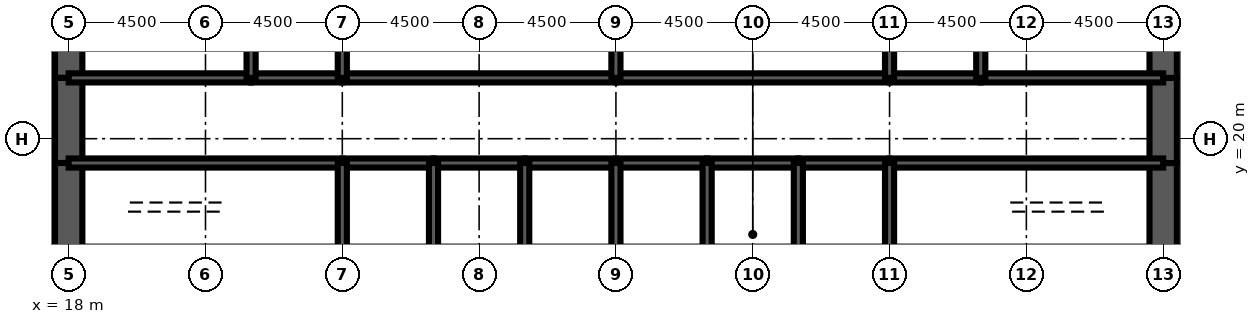
"""IFC4 building model, lengths in metres.
Left out: names, types, materials, properties, quantities, classifications, styles, units other than length and angle.
Written with IfcOpenShell. Run it as: python <this file> out.ifc"""

import sys

from ifc_helpers import new_model, si_unit, direction, frame, frame_2d, origin, place, context, subcontext, project, spatial, rectangle, extrude, element, fill, save


model = new_model("IFC4")
c1 = context("Model", 3, precision=1e-05, world=origin(), true_north=direction((0.0, 1.0)))
c2 = subcontext(c1, "Body", "Model", "MODEL_VIEW")
j1 = project(units=[si_unit("LENGTHUNIT", "METRE"), si_unit("PLANEANGLEUNIT", "RADIAN")], contexts=[c1])
p1 = place(None, origin())
s1 = spatial("IfcSite", under=j1, at=p1, CompositionType="ELEMENT")
p2 = place(p1, origin())
s2 = spatial("IfcBuilding", under=s1, at=p2, CompositionType="ELEMENT")
p3 = place(p2, frame((0.0, 0.0, 108.9)))
s3 = spatial("IfcBuildingStorey", under=s2, at=p3, CompositionType="ELEMENT", Elevation=108.9)
p4 = place(p3, frame((18.0, 26.0, 0.0), z_axis=(0.0, 0.0, 1.0), x_axis=(0.0, -1.0, 0.0)))
e1 = element("IfcWall", 1, at=p4, inside=s3, PredefinedType="SHEAR", context=c2, shape_type="SweptSolid", body=[
    extrude(rectangle(XDim=4.0, YDim=0.9, at=frame_2d((2.0, 0.0))), origin(), (0.0, 0.0, 1.0), 4.2),
])
p5 = place(p3, frame((18.0, 22.0, 0.0), z_axis=(0.0, 0.0, 1.0), x_axis=(0.0, -1.0, 0.0)))
e2 = element("IfcWall", 2, at=p5, inside=s3, PredefinedType="SHEAR", context=c2, shape_type="SweptSolid", body=[
    extrude(rectangle(XDim=2.8, YDim=0.9, at=frame_2d((1.4, 0.0))), origin(), (0.0, 0.0, 1.0), 4.2),
])
p6 = place(p5, frame((0.6, 0.0, 0.0)))
e3 = element("IfcOpeningElement", 3, at=p6, cuts=e2, PredefinedType="OPENING", context=c2, shape_type="SweptSolid", body=[
    extrude(rectangle(XDim=1.8, YDim=2.1, at=frame_2d((0.9, 1.05))), frame((0.0, 0.46, 0.0), z_axis=(0.0, -1.0, 0.0), x_axis=(1.0, 0.0, 0.0)), (0.0, 0.0, 1.0), 0.92),
])
for number, where, z_axis, x_axis in (
    (4, (18.0, 19.2, 0.0), (0.0, 0.0, 1.0), (0.0, -1.0, 0.0)),
    (5, (54.0, 16.0, 0.0), (0.0, 0.0, 1.0), (0.0, 1.0, 0.0)),
):
    element("IfcWall", number, at=place(p3, frame(where, z_axis=z_axis, x_axis=x_axis)), inside=s3, PredefinedType="SHEAR", context=c2, shape_type="SweptSolid", body=[
        extrude(rectangle(XDim=3.2, YDim=0.9, at=frame_2d((1.6, 0.0))), origin(), (0.0, 0.0, 1.0), 4.2),
    ])
p7 = place(p3, frame((54.0, 19.2, 0.0), z_axis=(0.0, 0.0, 1.0), x_axis=(0.0, 1.0, 0.0)))
e6 = element("IfcWall", 6, at=p7, inside=s3, PredefinedType="SHEAR", context=c2, shape_type="SweptSolid", body=[
    extrude(rectangle(XDim=2.8, YDim=0.9, at=frame_2d((1.4, 0.0))), origin(), (0.0, 0.0, 1.0), 4.2),
])
p8 = place(p7, frame((0.4, 0.0, 0.0)))
e7 = element("IfcOpeningElement", 7, at=p8, cuts=e6, PredefinedType="OPENING", context=c2, shape_type="SweptSolid", body=[
    extrude(rectangle(XDim=1.8, YDim=2.1, at=frame_2d((0.9, 1.05))), frame((0.0, 0.46, 0.0), z_axis=(0.0, -1.0, 0.0), x_axis=(1.0, 0.0, 0.0)), (0.0, 0.0, 1.0), 0.92),
])
p9 = place(p3, frame((54.0, 22.0, 0.0), z_axis=(0.0, 0.0, 1.0), x_axis=(0.0, 1.0, 0.0)))
e8 = element("IfcWall", 8, at=p9, inside=s3, PredefinedType="SHEAR", context=c2, shape_type="SweptSolid", body=[
    extrude(rectangle(XDim=4.0, YDim=0.9, at=frame_2d((2.0, 0.0))), origin(), (0.0, 0.0, 1.0), 4.2),
])
p10 = place(p3, frame((18.0, 19.2, 0.0), z_axis=(0.0, 0.0, 1.0), x_axis=(1.0, 0.0, 0.0)))
e9 = element("IfcWall", 9, at=p10, inside=s3, PredefinedType="SOLIDWALL", context=c2, shape_type="SweptSolid", body=[
    extrude(rectangle(XDim=9.0, YDim=0.3, at=frame_2d((4.5, 0.0))), origin(), (0.0, 0.0, 1.0), 4.2),
])
p11 = place(p10, frame((0.65, 0.0, 0.0)))
e10 = element("IfcOpeningElement", 10, at=p11, cuts=e9, PredefinedType="OPENING", context=c2, shape_type="SweptSolid", body=[
    extrude(rectangle(XDim=1.0, YDim=2.1, at=frame_2d((0.5, 1.05))), frame((0.0, 0.16, 0.0), z_axis=(0.0, -1.0, 0.0), x_axis=(1.0, 0.0, 0.0)), (0.0, 0.0, 1.0), 0.32),
])
p12 = place(p3, frame((27.0, 19.2, 0.0), z_axis=(0.0, 0.0, 1.0), x_axis=(1.0, 0.0, 0.0)))
e11 = element("IfcWall", 11, at=p12, inside=s3, PredefinedType="SOLIDWALL", context=c2, shape_type="SweptSolid", body=[
    extrude(rectangle(XDim=3.0, YDim=0.3, at=frame_2d((1.5, 0.0))), origin(), (0.0, 0.0, 1.0), 4.2),
])
p13 = place(p12, frame((0.95, 0.0, 0.0)))
e12 = element("IfcOpeningElement", 12, at=p13, cuts=e11, PredefinedType="OPENING", context=c2, shape_type="SweptSolid", body=[
    extrude(rectangle(XDim=1.1, YDim=2.2, at=frame_2d((0.55, 1.1))), frame((0.0, 0.16, 0.0), z_axis=(0.0, -1.0, 0.0), x_axis=(1.0, 0.0, 0.0)), (0.0, 0.0, 1.0), 0.32),
])
p14 = place(p3, frame((30.0, 19.2, 0.0), z_axis=(0.0, 0.0, 1.0), x_axis=(1.0, 0.0, 0.0)))
e13 = element("IfcWall", 13, at=p14, inside=s3, PredefinedType="SOLIDWALL", context=c2, shape_type="SweptSolid", body=[
    extrude(rectangle(XDim=3.0, YDim=0.3, at=frame_2d((1.5, 0.0))), origin(), (0.0, 0.0, 1.0), 4.2),
])
p15 = place(p14, frame((0.95, 0.0, 0.0)))
e14 = element("IfcOpeningElement", 14, at=p15, cuts=e13, PredefinedType="OPENING", context=c2, shape_type="SweptSolid", body=[
    extrude(rectangle(XDim=1.1, YDim=2.2, at=frame_2d((0.55, 1.1))), frame((0.0, 0.16, 0.0), z_axis=(0.0, -1.0, 0.0), x_axis=(1.0, 0.0, 0.0)), (0.0, 0.0, 1.0), 0.32),
])
p16 = place(p3, frame((33.0, 19.2, 0.0), z_axis=(0.0, 0.0, 1.0), x_axis=(1.0, 0.0, 0.0)))
e15 = element("IfcWall", 15, at=p16, inside=s3, PredefinedType="SOLIDWALL", context=c2, shape_type="SweptSolid", body=[
    extrude(rectangle(XDim=3.0, YDim=0.3, at=frame_2d((1.5, 0.0))), origin(), (0.0, 0.0, 1.0), 4.2),
])
p17 = place(p16, frame((0.95, 0.0, 0.0)))
e16 = element("IfcOpeningElement", 16, at=p17, cuts=e15, PredefinedType="OPENING", context=c2, shape_type="SweptSolid", body=[
    extrude(rectangle(XDim=1.1, YDim=2.2, at=frame_2d((0.55, 1.1))), frame((0.0, 0.16, 0.0), z_axis=(0.0, -1.0, 0.0), x_axis=(1.0, 0.0, 0.0)), (0.0, 0.0, 1.0), 0.32),
])
p18 = place(p3, frame((36.0, 19.2, 0.0), z_axis=(0.0, 0.0, 1.0), x_axis=(1.0, 0.0, 0.0)))
e17 = element("IfcWall", 17, at=p18, inside=s3, PredefinedType="SOLIDWALL", context=c2, shape_type="SweptSolid", body=[
    extrude(rectangle(XDim=3.0, YDim=0.3, at=frame_2d((1.5, 0.0))), origin(), (0.0, 0.0, 1.0), 4.2),
])
p19 = place(p18, frame((0.95, 0.0, 0.0)))
e18 = element("IfcOpeningElement", 18, at=p19, cuts=e17, PredefinedType="OPENING", context=c2, shape_type="SweptSolid", body=[
    extrude(rectangle(XDim=1.1, YDim=2.2, at=frame_2d((0.55, 1.1))), frame((0.0, 0.16, 0.0), z_axis=(0.0, -1.0, 0.0), x_axis=(1.0, 0.0, 0.0)), (0.0, 0.0, 1.0), 0.32),
])
p20 = place(p3, frame((39.0, 19.2, 0.0), z_axis=(0.0, 0.0, 1.0), x_axis=(1.0, 0.0, 0.0)))
e19 = element("IfcWall", 19, at=p20, inside=s3, PredefinedType="SOLIDWALL", context=c2, shape_type="SweptSolid", body=[
    extrude(rectangle(XDim=3.0, YDim=0.3, at=frame_2d((1.5, 0.0))), origin(), (0.0, 0.0, 1.0), 4.2),
])
p21 = place(p20, frame((1.0, 0.0, 0.0)))
e20 = element("IfcOpeningElement", 20, at=p21, cuts=e19, PredefinedType="OPENING", context=c2, shape_type="SweptSolid", body=[
    extrude(rectangle(XDim=1.0, YDim=2.1, at=frame_2d((0.5, 1.05))), frame((0.0, 0.16, 0.0), z_axis=(0.0, -1.0, 0.0), x_axis=(1.0, 0.0, 0.0)), (0.0, 0.0, 1.0), 0.32),
])
p22 = place(p3, frame((42.0, 19.2, 0.0), z_axis=(0.0, 0.0, 1.0), x_axis=(1.0, 0.0, 0.0)))
e21 = element("IfcWall", 21, at=p22, inside=s3, PredefinedType="SOLIDWALL", context=c2, shape_type="SweptSolid", body=[
    extrude(rectangle(XDim=3.0, YDim=0.3, at=frame_2d((1.5, 0.0))), origin(), (0.0, 0.0, 1.0), 4.2),
])
p23 = place(p3, frame((45.0, 19.2, 0.0), z_axis=(0.0, 0.0, 1.0), x_axis=(1.0, 0.0, 0.0)))
e22 = element("IfcWall", 22, at=p23, inside=s3, PredefinedType="SOLIDWALL", context=c2, shape_type="SweptSolid", body=[
    extrude(rectangle(XDim=9.0, YDim=0.3, at=frame_2d((4.5, 0.0))), origin(), (0.0, 0.0, 1.0), 4.2),
])
p24 = place(p23, frame((7.35, 0.0, 0.0)))
e23 = element("IfcOpeningElement", 23, at=p24, cuts=e22, PredefinedType="OPENING", context=c2, shape_type="SweptSolid", body=[
    extrude(rectangle(XDim=1.0, YDim=2.1, at=frame_2d((0.5, 1.05))), frame((0.0, 0.16, 0.0), z_axis=(0.0, -1.0, 0.0), x_axis=(1.0, 0.0, 0.0)), (0.0, 0.0, 1.0), 0.32),
])
p25 = place(p3, frame((18.0, 22.0, 0.0), z_axis=(0.0, 0.0, 1.0), x_axis=(1.0, 0.0, 0.0)))
e24 = element("IfcWall", 24, at=p25, inside=s3, PredefinedType="SOLIDWALL", context=c2, shape_type="SweptSolid", body=[
    extrude(rectangle(XDim=6.0, YDim=0.3, at=frame_2d((3.0, 0.0))), origin(), (0.0, 0.0, 1.0), 4.2),
])
p26 = place(p25, frame((4.4, 0.0, 0.0)))
e25 = element("IfcOpeningElement", 25, at=p26, cuts=e24, PredefinedType="OPENING", context=c2, shape_type="SweptSolid", body=[
    extrude(rectangle(XDim=1.0, YDim=2.1, at=frame_2d((0.5, 1.05))), frame((0.0, 0.16, 0.0), z_axis=(0.0, -1.0, 0.0), x_axis=(1.0, 0.0, 0.0)), (0.0, 0.0, 1.0), 0.32),
])
p27 = place(p25, frame((0.85, 0.0, 0.0)))
e26 = element("IfcOpeningElement", 26, at=p27, cuts=e24, PredefinedType="OPENING", context=c2, shape_type="SweptSolid", body=[
    extrude(rectangle(XDim=1.0, YDim=2.1, at=frame_2d((0.5, 1.05))), frame((0.0, 0.16, 0.0), z_axis=(0.0, -1.0, 0.0), x_axis=(1.0, 0.0, 0.0)), (0.0, 0.0, 1.0), 0.32),
])
p28 = place(p3, frame((24.0, 22.0, 0.0), z_axis=(0.0, 0.0, 1.0), x_axis=(1.0, 0.0, 0.0)))
e27 = element("IfcWall", 27, at=p28, inside=s3, PredefinedType="SOLIDWALL", context=c2, shape_type="SweptSolid", body=[
    extrude(rectangle(XDim=3.0, YDim=0.3, at=frame_2d((1.5, 0.0))), origin(), (0.0, 0.0, 1.0), 4.2),
])
p29 = place(p28, frame((1.0, 0.0, 0.0)))
e28 = element("IfcOpeningElement", 28, at=p29, cuts=e27, PredefinedType="OPENING", context=c2, shape_type="SweptSolid", body=[
    extrude(rectangle(XDim=1.0, YDim=2.1, at=frame_2d((0.5, 1.05))), frame((0.0, 0.16, 0.0), z_axis=(0.0, -1.0, 0.0), x_axis=(1.0, 0.0, 0.0)), (0.0, 0.0, 1.0), 0.32),
])
p30 = place(p3, frame((27.0, 22.0, 0.0), z_axis=(0.0, 0.0, 1.0), x_axis=(1.0, 0.0, 0.0)))
e29 = element("IfcWall", 29, at=p30, inside=s3, PredefinedType="SOLIDWALL", context=c2, shape_type="SweptSolid", body=[
    extrude(rectangle(XDim=9.0, YDim=0.3, at=frame_2d((4.5, 0.0))), origin(), (0.0, 0.0, 1.0), 4.2),
])
p31 = place(p30, frame((4.0, 0.0, 0.0)))
e30 = element("IfcOpeningElement", 30, at=p31, cuts=e29, PredefinedType="OPENING", context=c2, shape_type="SweptSolid", body=[
    extrude(rectangle(XDim=1.0, YDim=2.1, at=frame_2d((0.5, 1.05))), frame((0.0, 0.16, 0.0), z_axis=(0.0, -1.0, 0.0), x_axis=(1.0, 0.0, 0.0)), (0.0, 0.0, 1.0), 0.32),
])
p32 = place(p3, frame((36.0, 22.0, 0.0), z_axis=(0.0, 0.0, 1.0), x_axis=(1.0, 0.0, 0.0)))
e31 = element("IfcWall", 31, at=p32, inside=s3, PredefinedType="SOLIDWALL", context=c2, shape_type="SweptSolid", body=[
    extrude(rectangle(XDim=9.0, YDim=0.3, at=frame_2d((4.5, 0.0))), origin(), (0.0, 0.0, 1.0), 4.2),
])
p33 = place(p32, frame((4.0, 0.0, 0.0)))
e32 = element("IfcOpeningElement", 32, at=p33, cuts=e31, PredefinedType="OPENING", context=c2, shape_type="SweptSolid", body=[
    extrude(rectangle(XDim=1.0, YDim=2.1, at=frame_2d((0.5, 1.05))), frame((0.0, 0.16, 0.0), z_axis=(0.0, -1.0, 0.0), x_axis=(1.0, 0.0, 0.0)), (0.0, 0.0, 1.0), 0.32),
])
p34 = place(p3, frame((45.0, 22.0, 0.0), z_axis=(0.0, 0.0, 1.0), x_axis=(1.0, 0.0, 0.0)))
e33 = element("IfcWall", 33, at=p34, inside=s3, PredefinedType="SOLIDWALL", context=c2, shape_type="SweptSolid", body=[
    extrude(rectangle(XDim=3.0, YDim=0.3, at=frame_2d((1.5, 0.0))), origin(), (0.0, 0.0, 1.0), 4.2),
])
p35 = place(p34, frame((1.0, 0.0, 0.0)))
e34 = element("IfcOpeningElement", 34, at=p35, cuts=e33, PredefinedType="OPENING", context=c2, shape_type="SweptSolid", body=[
    extrude(rectangle(XDim=1.0, YDim=2.1, at=frame_2d((0.5, 1.05))), frame((0.0, 0.16, 0.0), z_axis=(0.0, -1.0, 0.0), x_axis=(1.0, 0.0, 0.0)), (0.0, 0.0, 1.0), 0.32),
])
p36 = place(p3, frame((48.0, 22.0, 0.0), z_axis=(0.0, 0.0, 1.0), x_axis=(1.0, 0.0, 0.0)))
e35 = element("IfcWall", 35, at=p36, inside=s3, PredefinedType="SOLIDWALL", context=c2, shape_type="SweptSolid", body=[
    extrude(rectangle(XDim=6.0, YDim=0.3, at=frame_2d((3.0, 0.0))), origin(), (0.0, 0.0, 1.0), 4.2),
])
p37 = place(p36, frame((2.0, 0.0, 0.0)))
e36 = element("IfcOpeningElement", 36, at=p37, cuts=e35, PredefinedType="OPENING", context=c2, shape_type="SweptSolid", body=[
    extrude(rectangle(XDim=1.0, YDim=2.1, at=frame_2d((0.5, 1.05))), frame((0.0, 0.16, 0.0), z_axis=(0.0, -1.0, 0.0), x_axis=(1.0, 0.0, 0.0)), (0.0, 0.0, 1.0), 0.32),
])
p38 = place(p36, frame((4.15, 0.0, 0.0)))
e37 = element("IfcOpeningElement", 37, at=p38, cuts=e35, PredefinedType="OPENING", context=c2, shape_type="SweptSolid", body=[
    extrude(rectangle(XDim=1.0, YDim=2.1, at=frame_2d((0.5, 1.05))), frame((0.0, 0.16, 0.0), z_axis=(0.0, -1.0, 0.0), x_axis=(1.0, 0.0, 0.0)), (0.0, 0.0, 1.0), 0.32),
])
for number, where, z_axis, x_axis in (
    (38, (27.0, 16.0, 0.0), (0.0, 0.0, 1.0), (0.0, 1.0, 0.0)),
    (39, (30.0, 16.0, 0.0), (0.0, 0.0, 1.0), (0.0, 1.0, 0.0)),
    (40, (33.0, 16.0, 0.0), (0.0, 0.0, 1.0), (0.0, 1.0, 0.0)),
    (41, (36.0, 16.0, 0.0), (0.0, 0.0, 1.0), (0.0, 1.0, 0.0)),
    (42, (39.0, 16.0, 0.0), (0.0, 0.0, 1.0), (0.0, 1.0, 0.0)),
    (43, (42.0, 16.0, 0.0), (0.0, 0.0, 1.0), (0.0, 1.0, 0.0)),
    (44, (45.0, 16.0, 0.0), (0.0, 0.0, 1.0), (0.0, 1.0, 0.0)),
):
    element("IfcWall", number, at=place(p3, frame(where, z_axis=z_axis, x_axis=x_axis)), inside=s3, PredefinedType="SOLIDWALL", context=c2, shape_type="SweptSolid", body=[
        extrude(rectangle(XDim=3.2, YDim=0.3, at=frame_2d((1.6, 0.0))), origin(), (0.0, 0.0, 1.0), 4.2),
    ])
for number, where, z_axis, x_axis in (
    (45, (24.0, 22.0, 0.0), (0.0, 0.0, 1.0), (0.0, 1.0, 0.0)),
    (46, (27.0, 22.0, 0.0), (0.0, 0.0, 1.0), (0.0, 1.0, 0.0)),
    (47, (36.0, 22.0, 0.0), (0.0, 0.0, 1.0), (0.0, 1.0, 0.0)),
    (48, (45.0, 22.0, 0.0), (0.0, 0.0, 1.0), (0.0, 1.0, 0.0)),
    (49, (48.0, 22.0, 0.0), (0.0, 0.0, 1.0), (0.0, 1.0, 0.0)),
):
    element("IfcWall", number, at=place(p3, frame(where, z_axis=z_axis, x_axis=x_axis)), inside=s3, PredefinedType="SOLIDWALL", context=c2, shape_type="SweptSolid", body=[
        extrude(rectangle(XDim=4.0, YDim=0.3, at=frame_2d((2.0, 0.0))), origin(), (0.0, 0.0, 1.0), 4.2),
    ])
p39 = place(p3, frame((39.15, 17.4, 0.0), z_axis=(0.0, 0.0, 1.0), x_axis=(1.0, 0.0, 0.0)))
e50 = element("IfcWall", 50, at=p39, inside=s3, PredefinedType="SOLIDWALL", context=c2, shape_type="SweptSolid", body=[
    extrude(rectangle(XDim=2.7, YDim=0.3, at=frame_2d((1.35, 0.0))), origin(), (0.0, 0.0, 1.0), 4.04),
])
p40 = place(p39, frame((0.85, 0.0, 0.0)))
e51 = element("IfcOpeningElement", 51, at=p40, cuts=e50, PredefinedType="OPENING", context=c2, shape_type="SweptSolid", body=[
    extrude(rectangle(XDim=1.0, YDim=2.1, at=frame_2d((0.5, 1.05))), frame((0.0, 0.16, 0.0), z_axis=(0.0, -1.0, 0.0), x_axis=(1.0, 0.0, 0.0)), (0.0, 0.0, 1.0), 0.32),
])
for number, where, z_axis, x_axis in (
    (52, (20.325, 22.15, 0.0), (0.0, 0.0, 1.0), (0.0, 1.0, 0.0)),
    (53, (51.675, 22.15, 0.0), (0.0, 0.0, 1.0), (0.0, 1.0, 0.0)),
):
    element("IfcWall", number, at=place(p3, frame(where, z_axis=z_axis, x_axis=x_axis)), inside=s3, PredefinedType="PARTITIONING", context=c2, shape_type="SweptSolid", body=[
        extrude(rectangle(XDim=3.7, YDim=0.15, at=frame_2d((1.85, 0.0))), origin(), (0.0, 0.0, 1.0), 3.0),
    ])
p41 = place(p40, origin())
e54 = element("IfcDoor", 54, at=p41, inside=s3, OperationType="SINGLE_SWING_LEFT", PredefinedType="DOOR", context=c2, shape_type="SweptSolid", body=[
    extrude(rectangle(XDim=1.0, YDim=2.1, at=frame_2d((0.5, 1.05))), frame((0.0, 0.025, 0.0), z_axis=(0.0, -1.0, 0.0), x_axis=(1.0, 0.0, 0.0)), (0.0, 0.0, 1.0), 0.05),
])
fill(e51, e54)
p42 = place(p13, origin())
e55 = element("IfcDoor", 55, at=p42, inside=s3, OperationType="DOUBLE_DOOR_SLIDING", PredefinedType="USERDEFINED", context=c2, shape_type="SweptSolid", body=[
    extrude(rectangle(XDim=1.1, YDim=2.2, at=frame_2d((0.55, 1.1))), frame((0.0, 0.025, 0.0), z_axis=(0.0, -1.0, 0.0), x_axis=(1.0, 0.0, 0.0)), (0.0, 0.0, 1.0), 0.05),
])
fill(e12, e55)
p43 = place(p15, origin())
e56 = element("IfcDoor", 56, at=p43, inside=s3, OperationType="DOUBLE_DOOR_SLIDING", PredefinedType="USERDEFINED", context=c2, shape_type="SweptSolid", body=[
    extrude(rectangle(XDim=1.1, YDim=2.2, at=frame_2d((0.55, 1.1))), frame((0.0, 0.025, 0.0), z_axis=(0.0, -1.0, 0.0), x_axis=(1.0, 0.0, 0.0)), (0.0, 0.0, 1.0), 0.05),
])
fill(e14, e56)
p44 = place(p17, origin())
e57 = element("IfcDoor", 57, at=p44, inside=s3, OperationType="DOUBLE_DOOR_SLIDING", PredefinedType="USERDEFINED", context=c2, shape_type="SweptSolid", body=[
    extrude(rectangle(XDim=1.1, YDim=2.2, at=frame_2d((0.55, 1.1))), frame((0.0, 0.025, 0.0), z_axis=(0.0, -1.0, 0.0), x_axis=(1.0, 0.0, 0.0)), (0.0, 0.0, 1.0), 0.05),
])
fill(e16, e57)
p45 = place(p19, origin())
e58 = element("IfcDoor", 58, at=p45, inside=s3, OperationType="DOUBLE_DOOR_SLIDING", PredefinedType="USERDEFINED", context=c2, shape_type="SweptSolid", body=[
    extrude(rectangle(XDim=1.1, YDim=2.2, at=frame_2d((0.55, 1.1))), frame((0.0, 0.025, 0.0), z_axis=(0.0, -1.0, 0.0), x_axis=(1.0, 0.0, 0.0)), (0.0, 0.0, 1.0), 0.05),
])
fill(e18, e58)
p46 = place(p11, origin())
e59 = element("IfcDoor", 59, at=p46, inside=s3, OperationType="SINGLE_SWING_LEFT", PredefinedType="DOOR", context=c2, shape_type="SweptSolid", body=[
    extrude(rectangle(XDim=1.0, YDim=2.1, at=frame_2d((0.5, 1.05))), frame((0.0, 0.025, 0.0), z_axis=(0.0, -1.0, 0.0), x_axis=(1.0, 0.0, 0.0)), (0.0, 0.0, 1.0), 0.05),
])
fill(e10, e59)
p47 = place(p24, origin())
e60 = element("IfcDoor", 60, at=p47, inside=s3, OperationType="SINGLE_SWING_RIGHT", PredefinedType="DOOR", context=c2, shape_type="SweptSolid", body=[
    extrude(rectangle(XDim=1.0, YDim=2.1, at=frame_2d((0.5, 1.05))), frame((0.0, 0.025, 0.0), z_axis=(0.0, -1.0, 0.0), x_axis=(1.0, 0.0, 0.0)), (0.0, 0.0, 1.0), 0.05),
])
fill(e23, e60)
p48 = place(p6, origin())
e61 = element("IfcDoor", 61, at=p48, inside=s3, OperationType="SINGLE_SWING_LEFT", PredefinedType="DOOR", context=c2, shape_type="SweptSolid", body=[
    extrude(rectangle(XDim=1.8, YDim=2.1, at=frame_2d((0.9, 1.05))), frame((0.0, 0.45, 0.0), z_axis=(0.0, -1.0, 0.0), x_axis=(1.0, 0.0, 0.0)), (0.0, 0.0, 1.0), 0.899),
])
fill(e3, e61)
p49 = place(p8, origin())
e62 = element("IfcDoor", 62, at=p49, inside=s3, OperationType="SINGLE_SWING_LEFT", PredefinedType="DOOR", context=c2, shape_type="SweptSolid", body=[
    extrude(rectangle(XDim=1.8, YDim=2.1, at=frame_2d((0.9, 1.05))), frame((0.0, 0.45, 0.0), z_axis=(0.0, -1.0, 0.0), x_axis=(1.0, 0.0, 0.0)), (0.0, 0.0, 1.0), 0.899),
])
fill(e7, e62)
p50 = place(p26, origin())
e63 = element("IfcDoor", 63, at=p50, inside=s3, OperationType="SINGLE_SWING_RIGHT", PredefinedType="DOOR", context=c2, shape_type="SweptSolid", body=[
    extrude(rectangle(XDim=1.0, YDim=2.1, at=frame_2d((0.5, 1.05))), frame((0.0, 0.025, 0.0), z_axis=(0.0, -1.0, 0.0), x_axis=(1.0, 0.0, 0.0)), (0.0, 0.0, 1.0), 0.05),
])
fill(e25, e63)
p51 = place(p29, origin())
e64 = element("IfcDoor", 64, at=p51, inside=s3, OperationType="SINGLE_SWING_LEFT", PredefinedType="DOOR", context=c2, shape_type="SweptSolid", body=[
    extrude(rectangle(XDim=1.0, YDim=2.1, at=frame_2d((0.5, 1.05))), frame((0.0, 0.025, 0.0), z_axis=(0.0, -1.0, 0.0), x_axis=(1.0, 0.0, 0.0)), (0.0, 0.0, 1.0), 0.05),
])
fill(e28, e64)
p52 = place(p31, origin())
e65 = element("IfcDoor", 65, at=p52, inside=s3, OperationType="SINGLE_SWING_LEFT", PredefinedType="DOOR", context=c2, shape_type="SweptSolid", body=[
    extrude(rectangle(XDim=1.0, YDim=2.1, at=frame_2d((0.5, 1.05))), frame((0.0, 0.025, 0.0), z_axis=(0.0, -1.0, 0.0), x_axis=(1.0, 0.0, 0.0)), (0.0, 0.0, 1.0), 0.05),
])
fill(e30, e65)
p53 = place(p33, origin())
e66 = element("IfcDoor", 66, at=p53, inside=s3, OperationType="SINGLE_SWING_LEFT", PredefinedType="DOOR", context=c2, shape_type="SweptSolid", body=[
    extrude(rectangle(XDim=1.0, YDim=2.1, at=frame_2d((0.5, 1.05))), frame((0.0, 0.025, 0.0), z_axis=(0.0, -1.0, 0.0), x_axis=(1.0, 0.0, 0.0)), (0.0, 0.0, 1.0), 0.05),
])
fill(e32, e66)
p54 = place(p35, origin())
e67 = element("IfcDoor", 67, at=p54, inside=s3, OperationType="SINGLE_SWING_LEFT", PredefinedType="DOOR", context=c2, shape_type="SweptSolid", body=[
    extrude(rectangle(XDim=1.0, YDim=2.1, at=frame_2d((0.5, 1.05))), frame((0.0, 0.025, 0.0), z_axis=(0.0, -1.0, 0.0), x_axis=(1.0, 0.0, 0.0)), (0.0, 0.0, 1.0), 0.05),
])
fill(e34, e67)
p55 = place(p37, origin())
e68 = element("IfcDoor", 68, at=p55, inside=s3, OperationType="SINGLE_SWING_LEFT", PredefinedType="DOOR", context=c2, shape_type="SweptSolid", body=[
    extrude(rectangle(XDim=1.0, YDim=2.1, at=frame_2d((0.5, 1.05))), frame((0.0, 0.025, 0.0), z_axis=(0.0, -1.0, 0.0), x_axis=(1.0, 0.0, 0.0)), (0.0, 0.0, 1.0), 0.05),
])
fill(e36, e68)
p56 = place(p27, origin())
e69 = element("IfcDoor", 69, at=p56, inside=s3, OperationType="SINGLE_SWING_LEFT", PredefinedType="DOOR", context=c2, shape_type="SweptSolid", body=[
    extrude(rectangle(XDim=1.0, YDim=2.1, at=frame_2d((0.5, 1.05))), frame((0.0, 0.025, 0.0), z_axis=(0.0, -1.0, 0.0), x_axis=(1.0, 0.0, 0.0)), (0.0, 0.0, 1.0), 0.05),
])
fill(e26, e69)
p57 = place(p38, origin())
e70 = element("IfcDoor", 70, at=p57, inside=s3, OperationType="SINGLE_SWING_RIGHT", PredefinedType="DOOR", context=c2, shape_type="SweptSolid", body=[
    extrude(rectangle(XDim=1.0, YDim=2.1, at=frame_2d((0.5, 1.05))), frame((0.0, 0.025, 0.0), z_axis=(0.0, -1.0, 0.0), x_axis=(1.0, 0.0, 0.0)), (0.0, 0.0, 1.0), 0.05),
])
fill(e37, e70)
p58 = place(p21, origin())
e71 = element("IfcDoor", 71, at=p58, inside=s3, OperationType="SINGLE_SWING_LEFT", PredefinedType="DOOR", context=c2, shape_type="SweptSolid", body=[
    extrude(rectangle(XDim=1.0, YDim=2.1, at=frame_2d((0.5, 1.05))), frame((0.0, 0.025, 0.0), z_axis=(0.0, -1.0, 0.0), x_axis=(1.0, 0.0, 0.0)), (0.0, 0.0, 1.0), 0.05),
])
fill(e20, e71)
save(model, sys.argv[1])
